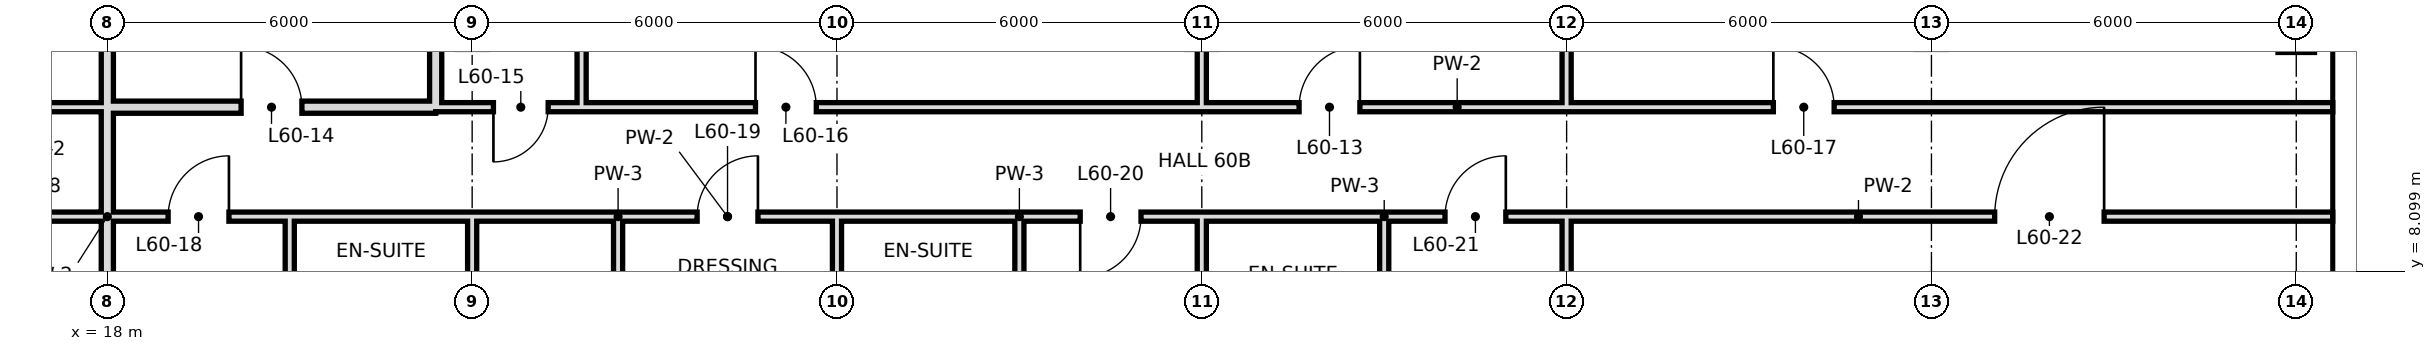
"""IFC4 building model, lengths in metres.
Left out: names, types, materials, properties, quantities, classifications, styles, units other than length and angle.
Written with IfcOpenShell. Run it as: python <this file> out.ifc"""

import sys

from ifc_helpers import new_model, si_unit, direction, frame, frame_2d, origin, place, context, subcontext, project, spatial, rectangle, extrude, element, fill, save


model = new_model("IFC4")
c1 = context("Model", 3, precision=1e-05, world=origin(), true_north=direction((0.0, 1.0)))
c2 = subcontext(c1, "Body", "Model", "MODEL_VIEW")
j1 = project(units=[si_unit("LENGTHUNIT", "METRE"), si_unit("PLANEANGLEUNIT", "RADIAN")], contexts=[c1])
p1 = place(None, origin())
s1 = spatial("IfcSite", under=j1, at=p1, CompositionType="ELEMENT")
p2 = place(p1, origin())
s2 = spatial("IfcBuilding", under=s1, at=p2, CompositionType="ELEMENT")
p3 = place(p2, frame((0.0, 0.0, 254.0)))
s3 = spatial("IfcBuildingStorey", under=s2, at=p3, CompositionType="ELEMENT", Elevation=254.0)
p4 = place(p3, frame((18.0, 10.8, 0.0), z_axis=(0.0, 0.0, 1.0), x_axis=(0.0, 1.0, 0.0)))
e1 = element("IfcWall", 1, at=p4, inside=s3, PredefinedType="SOLIDWALL", context=c2, shape_type="SweptSolid", body=[
    extrude(rectangle(XDim=7.9, YDim=0.2, at=frame_2d((3.95, 0.0))), origin(), (0.0, 0.0, 1.0), 2.68),
])
p5 = place(p3, frame((18.0, -0.6, 0.0), z_axis=(0.0, 0.0, 1.0), x_axis=(0.0, 1.0, 0.0)))
e2 = element("IfcWall", 2, at=p5, inside=s3, PredefinedType="SOLIDWALL", context=c2, shape_type="SweptSolid", body=[
    extrude(rectangle(XDim=11.4, YDim=0.2, at=frame_2d((5.7, 0.0))), origin(), (0.0, 0.0, 1.0), 2.68),
])
p6 = place(p3, frame((21.0, 6.0, 0.0), z_axis=(0.0, 0.0, 1.0), x_axis=(0.0, 1.0, 0.0)))
e3 = element("IfcWall", 3, at=p6, inside=s3, PredefinedType="PARTITIONING", context=c2, shape_type="SweptSolid", body=[
    extrude(rectangle(XDim=3.0, YDim=0.15, at=frame_2d((1.5, 0.0))), origin(), (0.0, 0.0, 1.0), 3.38),
])
p7 = place(p3, frame((23.4, 10.8, 0.0), z_axis=(0.0, 0.0, 1.0), x_axis=(0.0, 1.0, 0.0)))
e4 = element("IfcWall", 4, at=p7, inside=s3, PredefinedType="SOLIDWALL", context=c2, shape_type="SweptSolid", body=[
    extrude(rectangle(XDim=7.9, YDim=0.2, at=frame_2d((3.95, 0.0))), origin(), (0.0, 0.0, 1.0), 2.68),
])
p8 = place(p3, frame((24.0, 6.0, 0.0), z_axis=(0.0, 0.0, 1.0), x_axis=(0.0, 1.0, 0.0)))
e5 = element("IfcWall", 5, at=p8, inside=s3, PredefinedType="PARTITIONING", context=c2, shape_type="SweptSolid", body=[
    extrude(rectangle(XDim=3.0, YDim=0.15, at=frame_2d((1.5, 0.0))), origin(), (0.0, 0.0, 1.0), 2.68),
])
p9 = place(p3, frame((25.8, 10.8, 0.0), z_axis=(0.0, 0.0, 1.0), x_axis=(0.0, 1.0, 0.0)))
e6 = element("IfcWall", 6, at=p9, inside=s3, PredefinedType="PARTITIONING", context=c2, shape_type="SweptSolid", body=[
    extrude(rectangle(XDim=7.9, YDim=0.15, at=frame_2d((3.95, 0.0))), origin(), (0.0, 0.0, 1.0), 3.38),
])
p10 = place(p3, frame((26.4, 6.0, 0.0), z_axis=(0.0, 0.0, 1.0), x_axis=(0.0, 1.0, 0.0)))
e7 = element("IfcWall", 7, at=p10, inside=s3, PredefinedType="PARTITIONING", context=c2, shape_type="SweptSolid", body=[
    extrude(rectangle(XDim=3.0, YDim=0.15, at=frame_2d((1.5, 0.0))), origin(), (0.0, 0.0, 1.0), 3.38),
])
p11 = place(p3, frame((30.0, 6.0, 0.0), z_axis=(0.0, 0.0, 1.0), x_axis=(0.0, 1.0, 0.0)))
e8 = element("IfcWall", 8, at=p11, inside=s3, PredefinedType="PARTITIONING", context=c2, shape_type="SweptSolid", body=[
    extrude(rectangle(XDim=3.0, YDim=0.15, at=frame_2d((1.5, 0.0))), origin(), (0.0, 0.0, 1.0), 2.68),
])
p12 = place(p3, frame((33.0, 6.0, 0.0), z_axis=(0.0, 0.0, 1.0), x_axis=(0.0, 1.0, 0.0)))
e9 = element("IfcWall", 9, at=p12, inside=s3, PredefinedType="PARTITIONING", context=c2, shape_type="SweptSolid", body=[
    extrude(rectangle(XDim=3.0, YDim=0.15, at=frame_2d((1.5, 0.0))), origin(), (0.0, 0.0, 1.0), 3.38),
])
p13 = place(p3, frame((36.0, 10.8, 0.0), z_axis=(0.0, 0.0, 1.0), x_axis=(0.0, 1.0, 0.0)))
e10 = element("IfcWall", 10, at=p13, inside=s3, PredefinedType="PARTITIONING", context=c2, shape_type="SweptSolid", body=[
    extrude(rectangle(XDim=7.9, YDim=0.15, at=frame_2d((3.95, 0.0))), origin(), (0.0, 0.0, 1.0), 2.68),
])
p14 = place(p3, frame((36.0, 6.0, 0.0), z_axis=(0.0, 0.0, 1.0), x_axis=(0.0, 1.0, 0.0)))
e11 = element("IfcWall", 11, at=p14, inside=s3, PredefinedType="PARTITIONING", context=c2, shape_type="SweptSolid", body=[
    extrude(rectangle(XDim=3.0, YDim=0.15, at=frame_2d((1.5, 0.0))), origin(), (0.0, 0.0, 1.0), 2.68),
])
p15 = place(p3, frame((39.0, 6.0, 0.0), z_axis=(0.0, 0.0, 1.0), x_axis=(0.0, 1.0, 0.0)))
e12 = element("IfcWall", 12, at=p15, inside=s3, PredefinedType="PARTITIONING", context=c2, shape_type="SweptSolid", body=[
    extrude(rectangle(XDim=3.0, YDim=0.15, at=frame_2d((1.5, 0.0))), origin(), (0.0, 0.0, 1.0), 3.38),
])
p16 = place(p3, frame((42.0, -0.6, 0.0), z_axis=(0.0, 0.0, 1.0), x_axis=(0.0, 1.0, 0.0)))
e13 = element("IfcWall", 13, at=p16, inside=s3, PredefinedType="PARTITIONING", context=c2, shape_type="SweptSolid", body=[
    extrude(rectangle(XDim=9.6, YDim=0.15, at=frame_2d((4.8, 0.0))), origin(), (0.0, 0.0, 1.0), 2.68),
])
p17 = place(p3, frame((42.0, 10.8, 0.0), z_axis=(0.0, 0.0, 1.0), x_axis=(0.0, 1.0, 0.0)))
e14 = element("IfcWall", 14, at=p17, inside=s3, PredefinedType="PARTITIONING", context=c2, shape_type="SweptSolid", body=[
    extrude(rectangle(XDim=7.9, YDim=0.15, at=frame_2d((3.95, 0.0))), origin(), (0.0, 0.0, 1.0), 2.68),
])
p18 = place(p3, frame((18.0, 10.8, 0.0), z_axis=(0.0, 0.0, 1.0), x_axis=(1.0, 0.0, 0.0)))
e15 = element("IfcWall", 15, at=p18, inside=s3, PredefinedType="SOLIDWALL", context=c2, shape_type="SweptSolid", body=[
    extrude(rectangle(XDim=5.4, YDim=0.2, at=frame_2d((2.7, 0.0))), origin(), (0.0, 0.0, 1.0), 2.68),
])
p19 = place(p18, frame((2.2, 0.0, 0.0)))
e16 = element("IfcOpeningElement", 16, at=p19, cuts=e15, PredefinedType="OPENING", context=c2, shape_type="SweptSolid", body=[
    extrude(rectangle(XDim=1.0, YDim=2.4, at=frame_2d((0.5, 1.2))), frame((0.0, 0.11, 0.0), z_axis=(0.0, -1.0, 0.0), x_axis=(1.0, 0.0, 0.0)), (0.0, 0.0, 1.0), 0.22),
])
p20 = place(p3, frame((14.4, 10.8, 0.0), z_axis=(0.0, 0.0, 1.0), x_axis=(1.0, 0.0, 0.0)))
e17 = element("IfcWall", 17, at=p20, inside=s3, PredefinedType="PARTITIONING", context=c2, shape_type="SweptSolid", body=[
    extrude(rectangle(XDim=3.6, YDim=0.15, at=frame_2d((1.8, 0.0))), origin(), (0.0, 0.0, 1.0), 3.38),
])
p21 = place(p20, frame((0.88, 0.0, 0.0)))
e18 = element("IfcOpeningElement", 18, at=p21, cuts=e17, PredefinedType="OPENING", context=c2, shape_type="SweptSolid", body=[
    extrude(rectangle(XDim=1.0, YDim=2.4, at=frame_2d((0.5, 1.2))), frame((0.0, 0.085, 0.0), z_axis=(0.0, -1.0, 0.0), x_axis=(1.0, 0.0, 0.0)), (0.0, 0.0, 1.0), 0.17),
])
p22 = place(p3, frame((25.8, 10.8, 0.0), z_axis=(0.0, 0.0, 1.0), x_axis=(1.0, 0.0, 0.0)))
e19 = element("IfcWall", 19, at=p22, inside=s3, PredefinedType="PARTITIONING", context=c2, shape_type="SweptSolid", body=[
    extrude(rectangle(XDim=28.8, YDim=0.15, at=frame_2d((14.4, 0.0))), origin(), (0.0, 0.0, 1.0), 3.38),
])
p23 = place(p22, frame((11.8, 0.0, 0.0)))
e20 = element("IfcOpeningElement", 20, at=p23, cuts=e19, PredefinedType="OPENING", context=c2, shape_type="SweptSolid", body=[
    extrude(rectangle(XDim=1.0, YDim=2.4, at=frame_2d((0.5, 1.2))), frame((0.0, 0.085, 0.0), z_axis=(0.0, -1.0, 0.0), x_axis=(1.0, 0.0, 0.0)), (0.0, 0.0, 1.0), 0.17),
])
p24 = place(p22, frame((2.86, 0.0, 0.0)))
e21 = element("IfcOpeningElement", 21, at=p24, cuts=e19, PredefinedType="OPENING", context=c2, shape_type="SweptSolid", body=[
    extrude(rectangle(XDim=1.0, YDim=2.4, at=frame_2d((0.5, 1.2))), frame((0.0, 0.085, 0.0), z_axis=(0.0, -1.0, 0.0), x_axis=(1.0, 0.0, 0.0)), (0.0, 0.0, 1.0), 0.17),
])
p25 = place(p22, frame((19.6, 0.0, 0.0)))
e22 = element("IfcOpeningElement", 22, at=p25, cuts=e19, PredefinedType="OPENING", context=c2, shape_type="SweptSolid", body=[
    extrude(rectangle(XDim=1.0, YDim=2.4, at=frame_2d((0.5, 1.2))), frame((0.0, 0.085, 0.0), z_axis=(0.0, -1.0, 0.0), x_axis=(1.0, 0.0, 0.0)), (0.0, 0.0, 1.0), 0.17),
])
p26 = place(p3, frame((23.4, 10.8, 0.0), z_axis=(0.0, 0.0, 1.0), x_axis=(1.0, 0.0, 0.0)))
e23 = element("IfcWall", 23, at=p26, inside=s3, PredefinedType="PARTITIONING", context=c2, shape_type="SweptSolid", body=[
    extrude(rectangle(XDim=2.4, YDim=0.15, at=frame_2d((1.2, 0.0))), origin(), (0.0, 0.0, 1.0), 3.38),
])
p27 = place(p26, frame((0.95, 0.0, 0.0)))
e24 = element("IfcOpeningElement", 24, at=p27, cuts=e23, PredefinedType="OPENING", context=c2, shape_type="SweptSolid", body=[
    extrude(rectangle(XDim=0.9, YDim=2.4, at=frame_2d((0.45, 1.2))), frame((0.0, 0.085, 0.0), z_axis=(0.0, -1.0, 0.0), x_axis=(1.0, 0.0, 0.0)), (0.0, 0.0, 1.0), 0.17),
])
p28 = place(p3, frame((15.0, 9.0, 0.0), z_axis=(0.0, 0.0, 1.0), x_axis=(1.0, 0.0, 0.0)))
e25 = element("IfcWall", 25, at=p28, inside=s3, PredefinedType="PARTITIONING", context=c2, shape_type="SweptSolid", body=[
    extrude(rectangle(XDim=6.0, YDim=0.15, at=frame_2d((3.0, 0.0))), origin(), (0.0, 0.0, 1.0), 3.38),
])
p29 = place(p28, frame((0.7, 0.0, 0.0)))
e26 = element("IfcOpeningElement", 26, at=p29, cuts=e25, PredefinedType="OPENING", context=c2, shape_type="SweptSolid", body=[
    extrude(rectangle(XDim=1.0, YDim=2.4, at=frame_2d((0.5, 1.2))), frame((0.0, 0.085, 0.0), z_axis=(0.0, -1.0, 0.0), x_axis=(1.0, 0.0, 0.0)), (0.0, 0.0, 1.0), 0.17),
])
p30 = place(p28, frame((4.0, 0.0, 0.0)))
e27 = element("IfcOpeningElement", 27, at=p30, cuts=e25, PredefinedType="OPENING", context=c2, shape_type="SweptSolid", body=[
    extrude(rectangle(XDim=1.0, YDim=2.4, at=frame_2d((0.5, 1.2))), frame((0.0, 0.085, 0.0), z_axis=(0.0, -1.0, 0.0), x_axis=(1.0, 0.0, 0.0)), (0.0, 0.0, 1.0), 0.17),
])
p31 = place(p3, frame((26.4, 9.0, 0.0), z_axis=(0.0, 0.0, 1.0), x_axis=(1.0, 0.0, 0.0)))
e28 = element("IfcWall", 28, at=p31, inside=s3, PredefinedType="PARTITIONING", context=c2, shape_type="SweptSolid", body=[
    extrude(rectangle(XDim=3.6, YDim=0.15, at=frame_2d((1.8, 0.0))), origin(), (0.0, 0.0, 1.0), 3.38),
])
p32 = place(p31, frame((1.3, 0.0, 0.0)))
e29 = element("IfcOpeningElement", 29, at=p32, cuts=e28, PredefinedType="OPENING", context=c2, shape_type="SweptSolid", body=[
    extrude(rectangle(XDim=1.0, YDim=2.4, at=frame_2d((0.5, 1.2))), frame((0.0, 0.085, 0.0), z_axis=(0.0, -1.0, 0.0), x_axis=(1.0, 0.0, 0.0)), (0.0, 0.0, 1.0), 0.17),
])
p33 = place(p3, frame((33.0, 9.0, 0.0), z_axis=(0.0, 0.0, 1.0), x_axis=(1.0, 0.0, 0.0)))
e30 = element("IfcWall", 30, at=p33, inside=s3, PredefinedType="PARTITIONING", context=c2, shape_type="SweptSolid", body=[
    extrude(rectangle(XDim=3.0, YDim=0.15, at=frame_2d((1.5, 0.0))), origin(), (0.0, 0.0, 1.0), 3.38),
])
p34 = place(p33, frame((1.0, 0.0, 0.0)))
e31 = element("IfcOpeningElement", 31, at=p34, cuts=e30, PredefinedType="OPENING", context=c2, shape_type="SweptSolid", body=[
    extrude(rectangle(XDim=1.0, YDim=2.4, at=frame_2d((0.5, 1.2))), frame((0.0, 0.085, 0.0), z_axis=(0.0, -1.0, 0.0), x_axis=(1.0, 0.0, 0.0)), (0.0, 0.0, 1.0), 0.17),
])
p35 = place(p3, frame((39.0, 9.0, 0.0), z_axis=(0.0, 0.0, 1.0), x_axis=(1.0, 0.0, 0.0)))
e32 = element("IfcWall", 32, at=p35, inside=s3, PredefinedType="PARTITIONING", context=c2, shape_type="SweptSolid", body=[
    extrude(rectangle(XDim=15.6, YDim=0.15, at=frame_2d((7.8, 0.0))), origin(), (0.0, 0.0, 1.0), 3.38),
])
p36 = place(p35, frame((1.0, 0.0, 0.0)))
e33 = element("IfcOpeningElement", 33, at=p36, cuts=e32, PredefinedType="OPENING", context=c2, shape_type="SweptSolid", body=[
    extrude(rectangle(XDim=1.0, YDim=2.4, at=frame_2d((0.5, 1.2))), frame((0.0, 0.085, 0.0), z_axis=(0.0, -1.0, 0.0), x_axis=(1.0, 0.0, 0.0)), (0.0, 0.0, 1.0), 0.17),
])
p37 = place(p35, frame((10.04, 0.0, 0.0)))
e34 = element("IfcOpeningElement", 34, at=p37, cuts=e32, PredefinedType="OPENING", context=c2, shape_type="SweptSolid", body=[
    extrude(rectangle(XDim=1.8, YDim=2.4, at=frame_2d((0.9, 1.2))), frame((0.0, 0.085, 0.0), z_axis=(0.0, -1.0, 0.0), x_axis=(1.0, 0.0, 0.0)), (0.0, 0.0, 1.0), 0.17),
])
p38 = place(p3, frame((21.0, 9.0, 0.0), z_axis=(0.0, 0.0, 1.0), x_axis=(1.0, 0.0, 0.0)))
e35 = element("IfcWall", 35, at=p38, inside=s3, PredefinedType="PARTITIONING", context=c2, shape_type="SweptSolid", body=[
    extrude(rectangle(XDim=5.4, YDim=0.15, at=frame_2d((2.7, 0.0))), origin(), (0.0, 0.0, 1.0), 3.38),
])
for number, where, z_axis, x_axis in (
    (36, (30.0, 9.0, 0.0), (0.0, 0.0, 1.0), (1.0, 0.0, 0.0)),
    (37, (36.0, 9.0, 0.0), (0.0, 0.0, 1.0), (1.0, 0.0, 0.0)),
):
    element("IfcWall", number, at=place(p3, frame(where, z_axis=z_axis, x_axis=x_axis)), inside=s3, PredefinedType="PARTITIONING", context=c2, shape_type="SweptSolid", body=[
        extrude(rectangle(XDim=3.0, YDim=0.15, at=frame_2d((1.5, 0.0))), origin(), (0.0, 0.0, 1.0), 3.38),
    ])
p39 = place(p23, frame((1.0, 0.0, 0.0), z_axis=(0.0, 0.0, 1.0), x_axis=(-1.0, 0.0, 0.0)))
e38 = element("IfcDoor", 38, at=p39, inside=s3, OperationType="SINGLE_SWING_LEFT", PredefinedType="DOOR", context=c2, shape_type="SweptSolid", body=[
    extrude(rectangle(XDim=1.0, YDim=2.4, at=frame_2d((0.5, 1.2))), frame((0.0, 0.025, 0.0), z_axis=(0.0, -1.0, 0.0), x_axis=(1.0, 0.0, 0.0)), (0.0, 0.0, 1.0), 0.05),
])
fill(e20, e38)
p40 = place(p19, origin())
e39 = element("IfcDoor", 39, at=p40, inside=s3, OperationType="SINGLE_SWING_LEFT", PredefinedType="DOOR", context=c2, shape_type="SweptSolid", body=[
    extrude(rectangle(XDim=1.0, YDim=2.4, at=frame_2d((0.5, 1.2))), frame((0.0, 0.025, 0.0), z_axis=(0.0, -1.0, 0.0), x_axis=(1.0, 0.0, 0.0)), (0.0, 0.0, 1.0), 0.05),
])
fill(e16, e39)
p41 = place(p27, frame((0.9, 0.0, 0.0), z_axis=(0.0, 0.0, 1.0), x_axis=(-1.0, 0.0, 0.0)))
e40 = element("IfcDoor", 40, at=p41, inside=s3, OperationType="SINGLE_SWING_RIGHT", PredefinedType="DOOR", context=c2, shape_type="SweptSolid", body=[
    extrude(rectangle(XDim=0.9, YDim=2.4, at=frame_2d((0.45, 1.2))), frame((0.0, 0.025, 0.0), z_axis=(0.0, -1.0, 0.0), x_axis=(1.0, 0.0, 0.0)), (0.0, 0.0, 1.0), 0.05),
])
fill(e24, e40)
p42 = place(p24, origin())
e41 = element("IfcDoor", 41, at=p42, inside=s3, OperationType="SINGLE_SWING_LEFT", PredefinedType="DOOR", context=c2, shape_type="SweptSolid", body=[
    extrude(rectangle(XDim=1.0, YDim=2.4, at=frame_2d((0.5, 1.2))), frame((0.0, 0.025, 0.0), z_axis=(0.0, -1.0, 0.0), x_axis=(1.0, 0.0, 0.0)), (0.0, 0.0, 1.0), 0.05),
])
fill(e21, e41)
p43 = place(p25, origin())
e42 = element("IfcDoor", 42, at=p43, inside=s3, OperationType="SINGLE_SWING_LEFT", PredefinedType="DOOR", context=c2, shape_type="SweptSolid", body=[
    extrude(rectangle(XDim=1.0, YDim=2.4, at=frame_2d((0.5, 1.2))), frame((0.0, 0.025, 0.0), z_axis=(0.0, -1.0, 0.0), x_axis=(1.0, 0.0, 0.0)), (0.0, 0.0, 1.0), 0.05),
])
fill(e22, e42)
p44 = place(p30, frame((1.0, 0.0, 0.0), z_axis=(0.0, 0.0, 1.0), x_axis=(-1.0, 0.0, 0.0)))
e43 = element("IfcDoor", 43, at=p44, inside=s3, OperationType="SINGLE_SWING_LEFT", PredefinedType="DOOR", context=c2, shape_type="SweptSolid", body=[
    extrude(rectangle(XDim=1.0, YDim=2.4, at=frame_2d((0.5, 1.2))), frame((0.0, 0.025, 0.0), z_axis=(0.0, -1.0, 0.0), x_axis=(1.0, 0.0, 0.0)), (0.0, 0.0, 1.0), 0.05),
])
fill(e27, e43)
p45 = place(p32, frame((1.0, 0.0, 0.0), z_axis=(0.0, 0.0, 1.0), x_axis=(-1.0, 0.0, 0.0)))
e44 = element("IfcDoor", 44, at=p45, inside=s3, OperationType="SINGLE_SWING_LEFT", PredefinedType="DOOR", context=c2, shape_type="SweptSolid", body=[
    extrude(rectangle(XDim=1.0, YDim=2.4, at=frame_2d((0.5, 1.2))), frame((0.0, 0.025, 0.0), z_axis=(0.0, -1.0, 0.0), x_axis=(1.0, 0.0, 0.0)), (0.0, 0.0, 1.0), 0.05),
])
fill(e29, e44)
p46 = place(p34, frame((1.0, 0.0, 0.0), z_axis=(0.0, 0.0, 1.0), x_axis=(-1.0, 0.0, 0.0)))
e45 = element("IfcDoor", 45, at=p46, inside=s3, OperationType="SINGLE_SWING_RIGHT", PredefinedType="DOOR", context=c2, shape_type="SweptSolid", body=[
    extrude(rectangle(XDim=1.0, YDim=2.4, at=frame_2d((0.5, 1.2))), frame((0.0, 0.025, 0.0), z_axis=(0.0, -1.0, 0.0), x_axis=(1.0, 0.0, 0.0)), (0.0, 0.0, 1.0), 0.05),
])
fill(e31, e45)
p47 = place(p36, frame((1.0, 0.0, 0.0), z_axis=(0.0, 0.0, 1.0), x_axis=(-1.0, 0.0, 0.0)))
e46 = element("IfcDoor", 46, at=p47, inside=s3, OperationType="SINGLE_SWING_LEFT", PredefinedType="DOOR", context=c2, shape_type="SweptSolid", body=[
    extrude(rectangle(XDim=1.0, YDim=2.4, at=frame_2d((0.5, 1.2))), frame((0.0, 0.025, 0.0), z_axis=(0.0, -1.0, 0.0), x_axis=(1.0, 0.0, 0.0)), (0.0, 0.0, 1.0), 0.05),
])
fill(e33, e46)
p48 = place(p37, frame((1.8, 0.0, 0.0), z_axis=(0.0, 0.0, 1.0), x_axis=(-1.0, 0.0, 0.0)))
e47 = element("IfcDoor", 47, at=p48, inside=s3, OperationType="SINGLE_SWING_LEFT", PredefinedType="DOOR", context=c2, shape_type="SweptSolid", body=[
    extrude(rectangle(XDim=1.8, YDim=2.4, at=frame_2d((0.9, 1.2))), frame((0.0, 0.025, 0.0), z_axis=(0.0, -1.0, 0.0), x_axis=(1.0, 0.0, 0.0)), (0.0, 0.0, 1.0), 0.05),
])
fill(e34, e47)
save(model, sys.argv[1])
